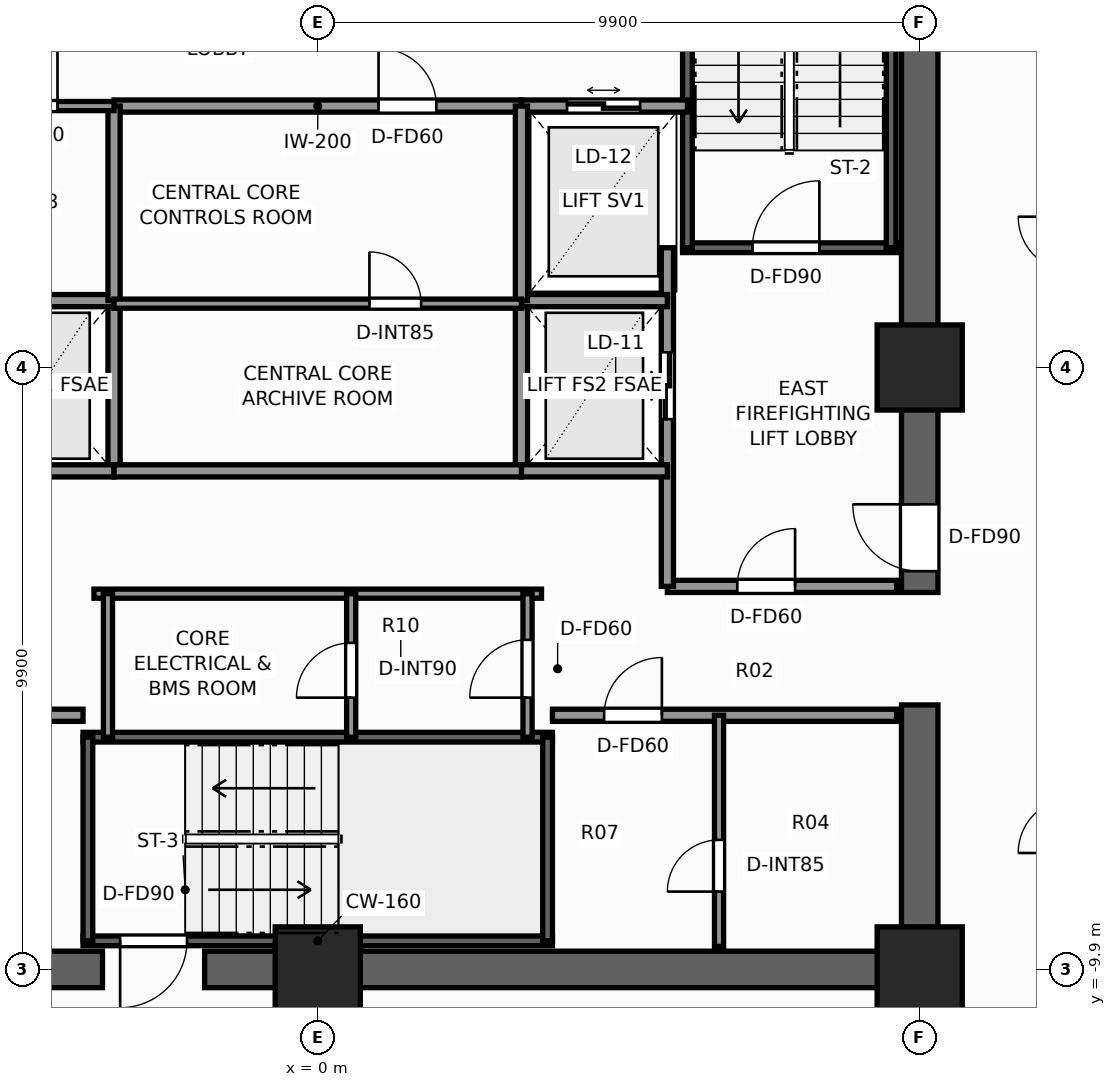
"""IFC4 building model, lengths in metres.
Left out: names, types, materials, properties, quantities, classifications, styles, units other than length and angle.
Written with IfcOpenShell. Run it as: python <this file> out.ifc"""

import sys

from ifc_helpers import new_model, si_unit, direction, frame, frame_2d, origin, origin_2d, place, context, subcontext, project, spatial, rectangle, extrude, element, fill, save


model = new_model("IFC4")
c1 = context("Model", 3, precision=1e-05, world=origin(), true_north=direction((0.0, 1.0)))
c2 = subcontext(c1, "Body", "Model", "MODEL_VIEW")
j1 = project(units=[si_unit("LENGTHUNIT", "METRE"), si_unit("PLANEANGLEUNIT", "RADIAN")], contexts=[c1])
p1 = place(None, origin())
s1 = spatial("IfcSite", under=j1, at=p1, CompositionType="ELEMENT")
p2 = place(p1, origin())
s2 = spatial("IfcBuilding", under=s1, at=p2, CompositionType="ELEMENT")
p3 = place(p2, frame((0.0, 0.0, 46.9)))
s3 = spatial("IfcBuildingStorey", under=s2, at=p3, CompositionType="ELEMENT", Elevation=46.9)
p4 = place(p3, frame((10.2, -9.9, 0.0), z_axis=(0.0, 0.0, 1.0), x_axis=(-1.0, 0.0, 0.0)))
e1 = element("IfcWall", 1, at=p4, inside=s3, PredefinedType="SHEAR", context=c2, shape_type="SweptSolid", body=[
    extrude(rectangle(XDim=12.06, YDim=0.6, at=frame_2d((6.03, 0.0))), origin(), (0.0, 0.0, 1.0), 3.3),
])
p5 = place(p3, frame((-3.54, -9.9, 0.0), z_axis=(0.0, 0.0, 1.0), x_axis=(-1.0, 0.0, 0.0)))
e2 = element("IfcWall", 2, at=p5, inside=s3, PredefinedType="SHEAR", context=c2, shape_type="SweptSolid", body=[
    extrude(rectangle(XDim=6.66, YDim=0.6, at=frame_2d((3.33, 0.0))), origin(), (0.0, 0.0, 1.0), 3.3),
])
p6 = place(p3, frame((9.9, -9.6, 0.0), z_axis=(0.0, 0.0, 1.0), x_axis=(0.0, 1.0, 0.0)))
e3 = element("IfcWall", 3, at=p6, inside=s3, PredefinedType="SHEAR", context=c2, shape_type="SweptSolid", body=[
    extrude(rectangle(XDim=4.05, YDim=0.6, at=frame_2d((2.025, 0.0))), origin(), (0.0, 0.0, 1.0), 3.3),
])
p7 = place(p3, frame((9.9, -3.7, 0.0), z_axis=(0.0, 0.0, 1.0), x_axis=(0.0, 1.0, 0.0)))
e4 = element("IfcWall", 4, at=p7, inside=s3, PredefinedType="SHEAR", context=c2, shape_type="SweptSolid", body=[
    extrude(rectangle(XDim=13.3, YDim=0.6, at=frame_2d((6.65, 0.0))), origin(), (0.0, 0.0, 1.0), 3.3),
])
p8 = place(p7, frame((0.35, 0.0, 0.0)))
e5 = element("IfcOpeningElement", 5, at=p8, cuts=e4, PredefinedType="OPENING", context=c2, shape_type="SweptSolid", body=[
    extrude(rectangle(XDim=1.1, YDim=2.2, at=frame_2d((0.55, 1.1))), frame((0.0, 0.31, 0.0), z_axis=(0.0, -1.0, 0.0), x_axis=(1.0, 0.0, 0.0)), (0.0, 0.0, 1.0), 0.62),
])
for number, where, z_axis, x_axis in (
    (6, (9.9, -9.9, 0.0), (0.0, 0.0, 1.0), (1.0, 0.0, 0.0)),
    (7, (0.0, -9.9, 0.0), (0.0, 0.0, 1.0), (1.0, 0.0, 0.0)),
    (8, (9.9, 0.0, 0.0), (0.0, 0.0, 1.0), (1.0, 0.0, 0.0)),
):
    element("IfcColumn", number, at=place(p3, frame(where, z_axis=z_axis, x_axis=x_axis)), inside=s3, PredefinedType="COLUMN", context=c2, shape_type="SweptSolid", body=[
        extrude(rectangle(XDim=1.4, YDim=1.4, at=origin_2d()), origin(), (0.0, 0.0, 1.0), 3.3),
    ])
p9 = place(p3, frame((6.0, 1.97, 0.0), z_axis=(0.0, 0.0, 1.0), x_axis=(1.0, 0.0, 0.0)))
e9 = element("IfcWall", 9, at=p9, inside=s3, PredefinedType="SHEAR", context=c2, shape_type="SweptSolid", body=[
    extrude(rectangle(XDim=3.52, YDim=0.16, at=frame_2d((1.76, 0.0))), origin(), (0.0, 0.0, 1.0), 3.3),
])
p10 = place(p9, frame((1.15, 0.0, 0.0)))
e10 = element("IfcOpeningElement", 10, at=p10, cuts=e9, PredefinedType="OPENING", context=c2, shape_type="SweptSolid", body=[
    extrude(rectangle(XDim=1.1, YDim=2.2, at=frame_2d((0.55, 1.1))), frame((0.0, 0.09, 0.0), z_axis=(0.0, -1.0, 0.0), x_axis=(1.0, 0.0, 0.0)), (0.0, 0.0, 1.0), 0.18),
])
for number, where, z_axis, x_axis in (
    (11, (6.08, 1.97, 0.0), (0.0, 0.0, 1.0), (0.0, 1.0, 0.0)),
    (12, (9.43, 1.97, 0.0), (0.0, 0.0, 1.0), (0.0, 1.0, 0.0)),
):
    element("IfcWall", number, at=place(p3, frame(where, z_axis=z_axis, x_axis=x_axis)), inside=s3, PredefinedType="SHEAR", context=c2, shape_type="SweptSolid", body=[
        extrude(rectangle(XDim=7.56, YDim=0.16, at=frame_2d((3.78, 0.0))), origin(), (0.0, 0.0, 1.0), 3.3),
    ])
p11 = place(p3, frame((3.86, -9.43, 0.0), z_axis=(0.0, 0.0, 1.0), x_axis=(-1.0, 0.0, 0.0)))
e13 = element("IfcWall", 13, at=p11, inside=s3, PredefinedType="SHEAR", context=c2, shape_type="SweptSolid", body=[
    extrude(rectangle(XDim=7.72, YDim=0.16, at=frame_2d((3.86, 0.0))), origin(), (0.0, 0.0, 1.0), 3.3),
])
p12 = place(p11, frame((6.01, 0.0, 0.0)))
e14 = element("IfcOpeningElement", 14, at=p12, cuts=e13, PredefinedType="OPENING", context=c2, shape_type="SweptSolid", body=[
    extrude(rectangle(XDim=1.1, YDim=2.2, at=frame_2d((0.55, 1.1))), frame((0.0, 0.09, 0.0), z_axis=(0.0, -1.0, 0.0), x_axis=(1.0, 0.0, 0.0)), (0.0, 0.0, 1.0), 0.18),
])
p13 = place(p3, frame((-3.86, -6.08, 0.0), z_axis=(0.0, 0.0, 1.0), x_axis=(1.0, 0.0, 0.0)))
e15 = element("IfcWall", 15, at=p13, inside=s3, PredefinedType="SHEAR", context=c2, shape_type="SweptSolid", body=[
    extrude(rectangle(XDim=7.72, YDim=0.16, at=frame_2d((3.86, 0.0))), origin(), (0.0, 0.0, 1.0), 3.3),
])
for number, where, z_axis, x_axis in (
    (16, (-3.78, -9.43, 0.0), (0.0, 0.0, 1.0), (0.0, 1.0, 0.0)),
    (17, (3.78, -9.43, 0.0), (0.0, 0.0, 1.0), (0.0, 1.0, 0.0)),
):
    element("IfcWall", number, at=place(p3, frame(where, z_axis=z_axis, x_axis=x_axis)), inside=s3, PredefinedType="SHEAR", context=c2, shape_type="SweptSolid", body=[
        extrude(rectangle(XDim=3.35, YDim=0.16, at=frame_2d((1.675, 0.0))), origin(), (0.0, 0.0, 1.0), 3.3),
    ])
p14 = place(p3, frame((-3.35, -1.7, 0.0), z_axis=(0.0, 0.0, 1.0), x_axis=(0.0, 1.0, 0.0)))
e18 = element("IfcWall", 18, at=p14, inside=s3, PredefinedType="SOLIDWALL", context=c2, shape_type="SweptSolid", body=[
    extrude(rectangle(XDim=2.8, YDim=0.2, at=frame_2d((1.4, 0.0))), origin(), (0.0, 0.0, 1.0), 3.06),
])
for number, where, z_axis, x_axis in (
    (19, (-5.75, -1.7, 0.0), (0.0, 0.0, 1.0), (1.0, 0.0, 0.0)),
    (20, (-5.75, 1.1, 0.0), (0.0, 0.0, 1.0), (1.0, 0.0, 0.0)),
):
    element("IfcWall", number, at=place(p3, frame(where, z_axis=z_axis, x_axis=x_axis)), inside=s3, PredefinedType="SOLIDWALL", context=c2, shape_type="SweptSolid", body=[
        extrude(rectangle(XDim=2.4, YDim=0.2, at=frame_2d((1.2, 0.0))), origin(), (0.0, 0.0, 1.0), 3.06),
    ])
p15 = place(p3, frame((5.75, -3.6, 0.0), z_axis=(0.0, 0.0, 1.0), x_axis=(1.0, 0.0, 0.0)))
e21 = element("IfcWall", 21, at=p15, inside=s3, PredefinedType="SOLIDWALL", context=c2, shape_type="SweptSolid", body=[
    extrude(rectangle(XDim=3.77, YDim=0.2, at=frame_2d((1.885, 0.0))), origin(), (0.0, 0.0, 1.0), 3.06),
])
p16 = place(p15, frame((1.15, 0.0, 0.0)))
e22 = element("IfcOpeningElement", 22, at=p16, cuts=e21, PredefinedType="OPENING", context=c2, shape_type="SweptSolid", body=[
    extrude(rectangle(XDim=0.95, YDim=2.06, at=frame_2d((0.475, 1.03))), frame((0.0, 0.11, 0.0), z_axis=(0.0, -1.0, 0.0), x_axis=(1.0, 0.0, 0.0)), (0.0, 0.0, 1.0), 0.22),
])
p17 = place(p3, frame((5.75, -3.6, 0.0), z_axis=(0.0, 0.0, 1.0), x_axis=(0.0, 1.0, 0.0)))
e23 = element("IfcWall", 23, at=p17, inside=s3, PredefinedType="SOLIDWALL", context=c2, shape_type="SweptSolid", body=[
    extrude(rectangle(XDim=5.57, YDim=0.2, at=frame_2d((2.785, 0.0))), origin(), (0.0, 0.0, 1.0), 3.06),
])
p18 = place(p17, frame((2.75, 0.0, 0.0)))
e24 = element("IfcOpeningElement", 24, at=p18, cuts=e23, PredefinedType="OPENING", context=c2, shape_type="SweptSolid", body=[
    extrude(rectangle(XDim=1.1, YDim=2.2, at=frame_2d((0.55, 1.1))), frame((0.0, 0.11, 0.0), z_axis=(0.0, -1.0, 0.0), x_axis=(1.0, 0.0, 0.0)), (0.0, 0.0, 1.0), 0.22),
])
p19 = place(p3, frame((3.35, -1.7, 0.0), z_axis=(0.0, 0.0, 1.0), x_axis=(0.0, 1.0, 0.0)))
e25 = element("IfcWall", 25, at=p19, inside=s3, PredefinedType="SOLIDWALL", context=c2, shape_type="SweptSolid", body=[
    extrude(rectangle(XDim=2.8, YDim=0.2, at=frame_2d((1.4, 0.0))), origin(), (0.0, 0.0, 1.0), 3.06),
])
for number, where, z_axis, x_axis in (
    (26, (3.35, -1.7, 0.0), (0.0, 0.0, 1.0), (1.0, 0.0, 0.0)),
    (27, (3.35, 1.1, 0.0), (0.0, 0.0, 1.0), (1.0, 0.0, 0.0)),
):
    element("IfcWall", number, at=place(p3, frame(where, z_axis=z_axis, x_axis=x_axis)), inside=s3, PredefinedType="SOLIDWALL", context=c2, shape_type="SweptSolid", body=[
        extrude(rectangle(XDim=2.4, YDim=0.2, at=frame_2d((1.2, 0.0))), origin(), (0.0, 0.0, 1.0), 3.06),
    ])
p20 = place(p3, frame((3.35, 4.3, 0.0), z_axis=(0.0, 0.0, 1.0), x_axis=(1.0, 0.0, 0.0)))
e28 = element("IfcWall", 28, at=p20, inside=s3, PredefinedType="SOLIDWALL", context=c2, shape_type="SweptSolid", body=[
    extrude(rectangle(XDim=2.73, YDim=0.2, at=frame_2d((1.365, 0.0))), origin(), (0.0, 0.0, 1.0), 3.06),
])
p21 = place(p20, frame((0.75, 0.0, 0.0)))
e29 = element("IfcOpeningElement", 29, at=p21, cuts=e28, PredefinedType="OPENING", context=c2, shape_type="SweptSolid", body=[
    extrude(rectangle(XDim=1.2, YDim=2.25, at=frame_2d((0.6, 1.125))), frame((0.0, 0.11, 0.0), z_axis=(0.0, -1.0, 0.0), x_axis=(1.0, 0.0, 0.0)), (0.0, 0.0, 1.0), 0.22),
])
p22 = place(p3, frame((-9.52, -5.72, 0.0), z_axis=(0.0, 0.0, 1.0), x_axis=(1.0, 0.0, 0.0)))
e30 = element("IfcWall", 30, at=p22, inside=s3, PredefinedType="SOLIDWALL", context=c2, shape_type="SweptSolid", body=[
    extrude(rectangle(XDim=5.66, YDim=0.2, at=frame_2d((2.83, 0.0))), origin(), (0.0, 0.0, 1.0), 3.06),
])
p23 = place(p22, frame((3.6, 0.0, 0.0)))
e31 = element("IfcOpeningElement", 31, at=p23, cuts=e30, PredefinedType="OPENING", context=c2, shape_type="SweptSolid", body=[
    extrude(rectangle(XDim=0.95, YDim=2.06, at=frame_2d((0.475, 1.03))), frame((0.0, 0.11, 0.0), z_axis=(0.0, -1.0, 0.0), x_axis=(1.0, 0.0, 0.0)), (0.0, 0.0, 1.0), 0.22),
])
p24 = place(p3, frame((3.86, -5.72, 0.0), z_axis=(0.0, 0.0, 1.0), x_axis=(1.0, 0.0, 0.0)))
e32 = element("IfcWall", 32, at=p24, inside=s3, PredefinedType="SOLIDWALL", context=c2, shape_type="SweptSolid", body=[
    extrude(rectangle(XDim=5.66, YDim=0.2, at=frame_2d((2.83, 0.0))), origin(), (0.0, 0.0, 1.0), 3.06),
])
p25 = place(p24, frame((0.85, 0.0, 0.0)))
e33 = element("IfcOpeningElement", 33, at=p25, cuts=e32, PredefinedType="OPENING", context=c2, shape_type="SweptSolid", body=[
    extrude(rectangle(XDim=0.95, YDim=2.06, at=frame_2d((0.475, 1.03))), frame((0.0, 0.11, 0.0), z_axis=(0.0, -1.0, 0.0), x_axis=(1.0, 0.0, 0.0)), (0.0, 0.0, 1.0), 0.22),
])
p26 = place(p3, frame((6.6, -9.52, 0.0), z_axis=(0.0, 0.0, 1.0), x_axis=(0.0, 1.0, 0.0)))
e34 = element("IfcWall", 34, at=p26, inside=s3, PredefinedType="PARTITIONING", context=c2, shape_type="SweptSolid", body=[
    extrude(rectangle(XDim=3.8, YDim=0.15, at=frame_2d((1.9, 0.0))), origin(), (0.0, 0.0, 1.0), 3.06),
])
p27 = place(p26, frame((0.9, 0.0, 0.0)))
e35 = element("IfcOpeningElement", 35, at=p27, cuts=e34, PredefinedType="OPENING", context=c2, shape_type="SweptSolid", body=[
    extrude(rectangle(XDim=0.85, YDim=2.03, at=frame_2d((0.425, 1.015))), frame((0.0, 0.085, 0.0), z_axis=(0.0, -1.0, 0.0), x_axis=(1.0, 0.0, 0.0)), (0.0, 0.0, 1.0), 0.17),
])
p28 = place(p3, frame((-3.35, 4.3, 0.0), z_axis=(0.0, 0.0, 1.0), x_axis=(1.0, 0.0, 0.0)))
e36 = element("IfcWall", 36, at=p28, inside=s3, PredefinedType="SOLIDWALL", context=c2, shape_type="SweptSolid", body=[
    extrude(rectangle(XDim=6.7, YDim=0.2, at=frame_2d((3.35, 0.0))), origin(), (0.0, 0.0, 1.0), 3.06),
])
p29 = place(p28, frame((4.35, 0.0, 0.0)))
e37 = element("IfcOpeningElement", 37, at=p29, cuts=e36, PredefinedType="OPENING", context=c2, shape_type="SweptSolid", body=[
    extrude(rectangle(XDim=0.95, YDim=2.06, at=frame_2d((0.475, 1.03))), frame((0.0, 0.11, 0.0), z_axis=(0.0, -1.0, 0.0), x_axis=(1.0, 0.0, 0.0)), (0.0, 0.0, 1.0), 0.22),
])
p30 = place(p3, frame((-3.35, -1.7, 0.0), z_axis=(0.0, 0.0, 1.0), x_axis=(1.0, 0.0, 0.0)))
e38 = element("IfcWall", 38, at=p30, inside=s3, PredefinedType="SOLIDWALL", context=c2, shape_type="SweptSolid", body=[
    extrude(rectangle(XDim=6.7, YDim=0.2, at=frame_2d((3.35, 0.0))), origin(), (0.0, 0.0, 1.0), 3.06),
])
for number, where, z_axis, x_axis in (
    (39, (-3.35, 1.1, 0.0), (0.0, 0.0, 1.0), (0.0, 1.0, 0.0)),
    (40, (3.35, 1.1, 0.0), (0.0, 0.0, 1.0), (0.0, 1.0, 0.0)),
):
    element("IfcWall", number, at=place(p3, frame(where, z_axis=z_axis, x_axis=x_axis)), inside=s3, PredefinedType="SOLIDWALL", context=c2, shape_type="SweptSolid", body=[
        extrude(rectangle(XDim=3.2, YDim=0.2, at=frame_2d((1.6, 0.0))), origin(), (0.0, 0.0, 1.0), 3.06),
    ])
p31 = place(p3, frame((-3.35, 1.05, 0.0), z_axis=(0.0, 0.0, 1.0), x_axis=(1.0, 0.0, 0.0)))
e41 = element("IfcWall", 41, at=p31, inside=s3, PredefinedType="PARTITIONING", context=c2, shape_type="SweptSolid", body=[
    extrude(rectangle(XDim=6.7, YDim=0.15, at=frame_2d((3.35, 0.0))), origin(), (0.0, 0.0, 1.0), 3.06),
])
p32 = place(p31, frame((4.2, 0.0, 0.0)))
e42 = element("IfcOpeningElement", 42, at=p32, cuts=e41, PredefinedType="OPENING", context=c2, shape_type="SweptSolid", body=[
    extrude(rectangle(XDim=0.85, YDim=2.03, at=frame_2d((0.425, 1.015))), frame((0.0, 0.085, 0.0), z_axis=(0.0, -1.0, 0.0), x_axis=(1.0, 0.0, 0.0)), (0.0, 0.0, 1.0), 0.17),
])
p33 = place(p3, frame((-3.68, -3.72, 0.0), z_axis=(0.0, 0.0, 1.0), x_axis=(1.0, 0.0, 0.0)))
e43 = element("IfcWall", 43, at=p33, inside=s3, PredefinedType="PARTITIONING", context=c2, shape_type="SweptSolid", body=[
    extrude(rectangle(XDim=7.36, YDim=0.15, at=frame_2d((3.68, 0.0))), origin(), (0.0, 0.0, 1.0), 3.06),
])
p34 = place(p3, frame((3.45, -6.08, 0.0), z_axis=(0.0, 0.0, 1.0), x_axis=(0.0, 1.0, 0.0)))
e44 = element("IfcWall", 44, at=p34, inside=s3, PredefinedType="PARTITIONING", context=c2, shape_type="SweptSolid", body=[
    extrude(rectangle(XDim=2.36, YDim=0.15, at=frame_2d((1.18, 0.0))), origin(), (0.0, 0.0, 1.0), 3.06),
])
p35 = place(p34, frame((0.65, 0.0, 0.0)))
e45 = element("IfcOpeningElement", 45, at=p35, cuts=e44, PredefinedType="OPENING", context=c2, shape_type="SweptSolid", body=[
    extrude(rectangle(XDim=0.95, YDim=2.06, at=frame_2d((0.475, 1.03))), frame((0.0, 0.085, 0.0), z_axis=(0.0, -1.0, 0.0), x_axis=(1.0, 0.0, 0.0)), (0.0, 0.0, 1.0), 0.17),
])
p36 = place(p3, frame((-3.45, -6.08, 0.0), z_axis=(0.0, 0.0, 1.0), x_axis=(0.0, 1.0, 0.0)))
e46 = element("IfcWall", 46, at=p36, inside=s3, PredefinedType="PARTITIONING", context=c2, shape_type="SweptSolid", body=[
    extrude(rectangle(XDim=2.36, YDim=0.15, at=frame_2d((1.18, 0.0))), origin(), (0.0, 0.0, 1.0), 3.06),
])
p37 = place(p3, frame((0.55, -6.08, 0.0), z_axis=(0.0, 0.0, 1.0), x_axis=(0.0, 1.0, 0.0)))
e47 = element("IfcWall", 47, at=p37, inside=s3, PredefinedType="PARTITIONING", context=c2, shape_type="SweptSolid", body=[
    extrude(rectangle(XDim=2.36, YDim=0.15, at=frame_2d((1.18, 0.0))), origin(), (0.0, 0.0, 1.0), 3.06),
])
p38 = place(p37, frame((0.65, 0.0, 0.0)))
e48 = element("IfcOpeningElement", 48, at=p38, cuts=e47, PredefinedType="OPENING", context=c2, shape_type="SweptSolid", body=[
    extrude(rectangle(XDim=0.9, YDim=2.06, at=frame_2d((0.45, 1.03))), frame((0.0, 0.085, 0.0), z_axis=(0.0, -1.0, 0.0), x_axis=(1.0, 0.0, 0.0)), (0.0, 0.0, 1.0), 0.17),
])
p39 = place(p3, frame((-6.08, 4.3, 0.0), z_axis=(0.0, 0.0, 1.0), x_axis=(1.0, 0.0, 0.0)))
e49 = element("IfcWall", 49, at=p39, inside=s3, PredefinedType="PARTITIONING", context=c2, shape_type="SweptSolid", body=[
    extrude(rectangle(XDim=2.73, YDim=0.15, at=frame_2d((1.365, 0.0))), origin(), (0.0, 0.0, 1.0), 3.06),
])
p40 = place(p39, frame((0.85, 0.0, 0.0)))
e50 = element("IfcOpeningElement", 50, at=p40, cuts=e49, PredefinedType="OPENING", context=c2, shape_type="SweptSolid", body=[
    extrude(rectangle(XDim=0.95, YDim=2.06, at=frame_2d((0.475, 1.03))), frame((0.0, 0.085, 0.0), z_axis=(0.0, -1.0, 0.0), x_axis=(1.0, 0.0, 0.0)), (0.0, 0.0, 1.0), 0.17),
])
p41 = place(p10, origin())
e51 = element("IfcDoor", 51, at=p41, inside=s3, OperationType="SINGLE_SWING_RIGHT", PredefinedType="DOOR", context=c2, shape_type="SweptSolid", body=[
    extrude(rectangle(XDim=1.1, YDim=2.2, at=frame_2d((0.55, 1.1))), frame((0.0, 0.025, 0.0), z_axis=(0.0, -1.0, 0.0), x_axis=(1.0, 0.0, 0.0)), (0.0, 0.0, 1.0), 0.05),
])
fill(e10, e51)
p42 = place(p12, origin())
e52 = element("IfcDoor", 52, at=p42, inside=s3, OperationType="SINGLE_SWING_RIGHT", PredefinedType="DOOR", context=c2, shape_type="SweptSolid", body=[
    extrude(rectangle(XDim=1.1, YDim=2.2, at=frame_2d((0.55, 1.1))), frame((0.0, 0.025, 0.0), z_axis=(0.0, -1.0, 0.0), x_axis=(1.0, 0.0, 0.0)), (0.0, 0.0, 1.0), 0.05),
])
fill(e14, e52)
p43 = place(p8, origin())
e53 = element("IfcDoor", 53, at=p43, inside=s3, OperationType="SINGLE_SWING_RIGHT", PredefinedType="DOOR", context=c2, shape_type="SweptSolid", body=[
    extrude(rectangle(XDim=1.1, YDim=2.2, at=frame_2d((0.55, 1.1))), frame((0.0, 0.025, 0.0), z_axis=(0.0, -1.0, 0.0), x_axis=(1.0, 0.0, 0.0)), (0.0, 0.0, 1.0), 0.05),
])
fill(e5, e53)
p44 = place(p18, origin())
e54 = element("IfcDoor", 54, at=p44, inside=s3, OperationType="DOUBLE_DOOR_SLIDING", PredefinedType="DOOR", context=c2, shape_type="SweptSolid", body=[
    extrude(rectangle(XDim=1.1, YDim=2.2, at=frame_2d((0.55, 1.1))), frame((0.0, 0.025, 0.0), z_axis=(0.0, -1.0, 0.0), x_axis=(1.0, 0.0, 0.0)), (0.0, 0.0, 1.0), 0.05),
])
fill(e24, e54)
p45 = place(p21, origin())
e55 = element("IfcDoor", 55, at=p45, inside=s3, OperationType="DOUBLE_DOOR_SLIDING", PredefinedType="DOOR", context=c2, shape_type="SweptSolid", body=[
    extrude(rectangle(XDim=1.2, YDim=2.25, at=frame_2d((0.6, 1.125))), frame((0.0, 0.025, 0.0), z_axis=(0.0, -1.0, 0.0), x_axis=(1.0, 0.0, 0.0)), (0.0, 0.0, 1.0), 0.05),
])
fill(e29, e55)
p46 = place(p25, origin())
e56 = element("IfcDoor", 56, at=p46, inside=s3, OperationType="SINGLE_SWING_RIGHT", PredefinedType="DOOR", context=c2, shape_type="SweptSolid", body=[
    extrude(rectangle(XDim=0.95, YDim=2.06, at=frame_2d((0.475, 1.03))), frame((0.0, 0.025, 0.0), z_axis=(0.0, -1.0, 0.0), x_axis=(1.0, 0.0, 0.0)), (0.0, 0.0, 1.0), 0.05),
])
fill(e33, e56)
p47 = place(p27, origin())
e57 = element("IfcDoor", 57, at=p47, inside=s3, OperationType="SINGLE_SWING_LEFT", PredefinedType="DOOR", context=c2, shape_type="SweptSolid", body=[
    extrude(rectangle(XDim=0.85, YDim=2.03, at=frame_2d((0.425, 1.015))), frame((0.0, 0.025, 0.0), z_axis=(0.0, -1.0, 0.0), x_axis=(1.0, 0.0, 0.0)), (0.0, 0.0, 1.0), 0.05),
])
fill(e35, e57)
p48 = place(p16, origin())
e58 = element("IfcDoor", 58, at=p48, inside=s3, OperationType="SINGLE_SWING_RIGHT", PredefinedType="DOOR", context=c2, shape_type="SweptSolid", body=[
    extrude(rectangle(XDim=0.95, YDim=2.06, at=frame_2d((0.475, 1.03))), frame((0.0, 0.025, 0.0), z_axis=(0.0, -1.0, 0.0), x_axis=(1.0, 0.0, 0.0)), (0.0, 0.0, 1.0), 0.05),
])
fill(e22, e58)
p49 = place(p29, origin())
e59 = element("IfcDoor", 59, at=p49, inside=s3, OperationType="SINGLE_SWING_LEFT", PredefinedType="DOOR", context=c2, shape_type="SweptSolid", body=[
    extrude(rectangle(XDim=0.95, YDim=2.06, at=frame_2d((0.475, 1.03))), frame((0.0, 0.025, 0.0), z_axis=(0.0, -1.0, 0.0), x_axis=(1.0, 0.0, 0.0)), (0.0, 0.0, 1.0), 0.05),
])
fill(e37, e59)
p50 = place(p32, origin())
e60 = element("IfcDoor", 60, at=p50, inside=s3, OperationType="SINGLE_SWING_LEFT", PredefinedType="DOOR", context=c2, shape_type="SweptSolid", body=[
    extrude(rectangle(XDim=0.85, YDim=2.03, at=frame_2d((0.425, 1.015))), frame((0.0, 0.025, 0.0), z_axis=(0.0, -1.0, 0.0), x_axis=(1.0, 0.0, 0.0)), (0.0, 0.0, 1.0), 0.05),
])
fill(e42, e60)
p51 = place(p35, origin())
e61 = element("IfcDoor", 61, at=p51, inside=s3, OperationType="SINGLE_SWING_LEFT", PredefinedType="DOOR", context=c2, shape_type="SweptSolid", body=[
    extrude(rectangle(XDim=0.95, YDim=2.06, at=frame_2d((0.475, 1.03))), frame((0.0, 0.025, 0.0), z_axis=(0.0, -1.0, 0.0), x_axis=(1.0, 0.0, 0.0)), (0.0, 0.0, 1.0), 0.05),
])
fill(e45, e61)
p52 = place(p38, origin())
e62 = element("IfcDoor", 62, at=p52, inside=s3, OperationType="SINGLE_SWING_LEFT", PredefinedType="DOOR", context=c2, shape_type="SweptSolid", body=[
    extrude(rectangle(XDim=0.9, YDim=2.06, at=frame_2d((0.45, 1.03))), frame((0.0, 0.025, 0.0), z_axis=(0.0, -1.0, 0.0), x_axis=(1.0, 0.0, 0.0)), (0.0, 0.0, 1.0), 0.05),
])
fill(e48, e62)
p53 = place(p40, origin())
e63 = element("IfcDoor", 63, at=p53, inside=s3, OperationType="SINGLE_SWING_RIGHT", PredefinedType="DOOR", context=c2, shape_type="SweptSolid", body=[
    extrude(rectangle(XDim=0.95, YDim=2.06, at=frame_2d((0.475, 1.03))), frame((0.0, 0.025, 0.0), z_axis=(0.0, -1.0, 0.0), x_axis=(1.0, 0.0, 0.0)), (0.0, 0.0, 1.0), 0.05),
])
fill(e50, e63)
save(model, sys.argv[1])
